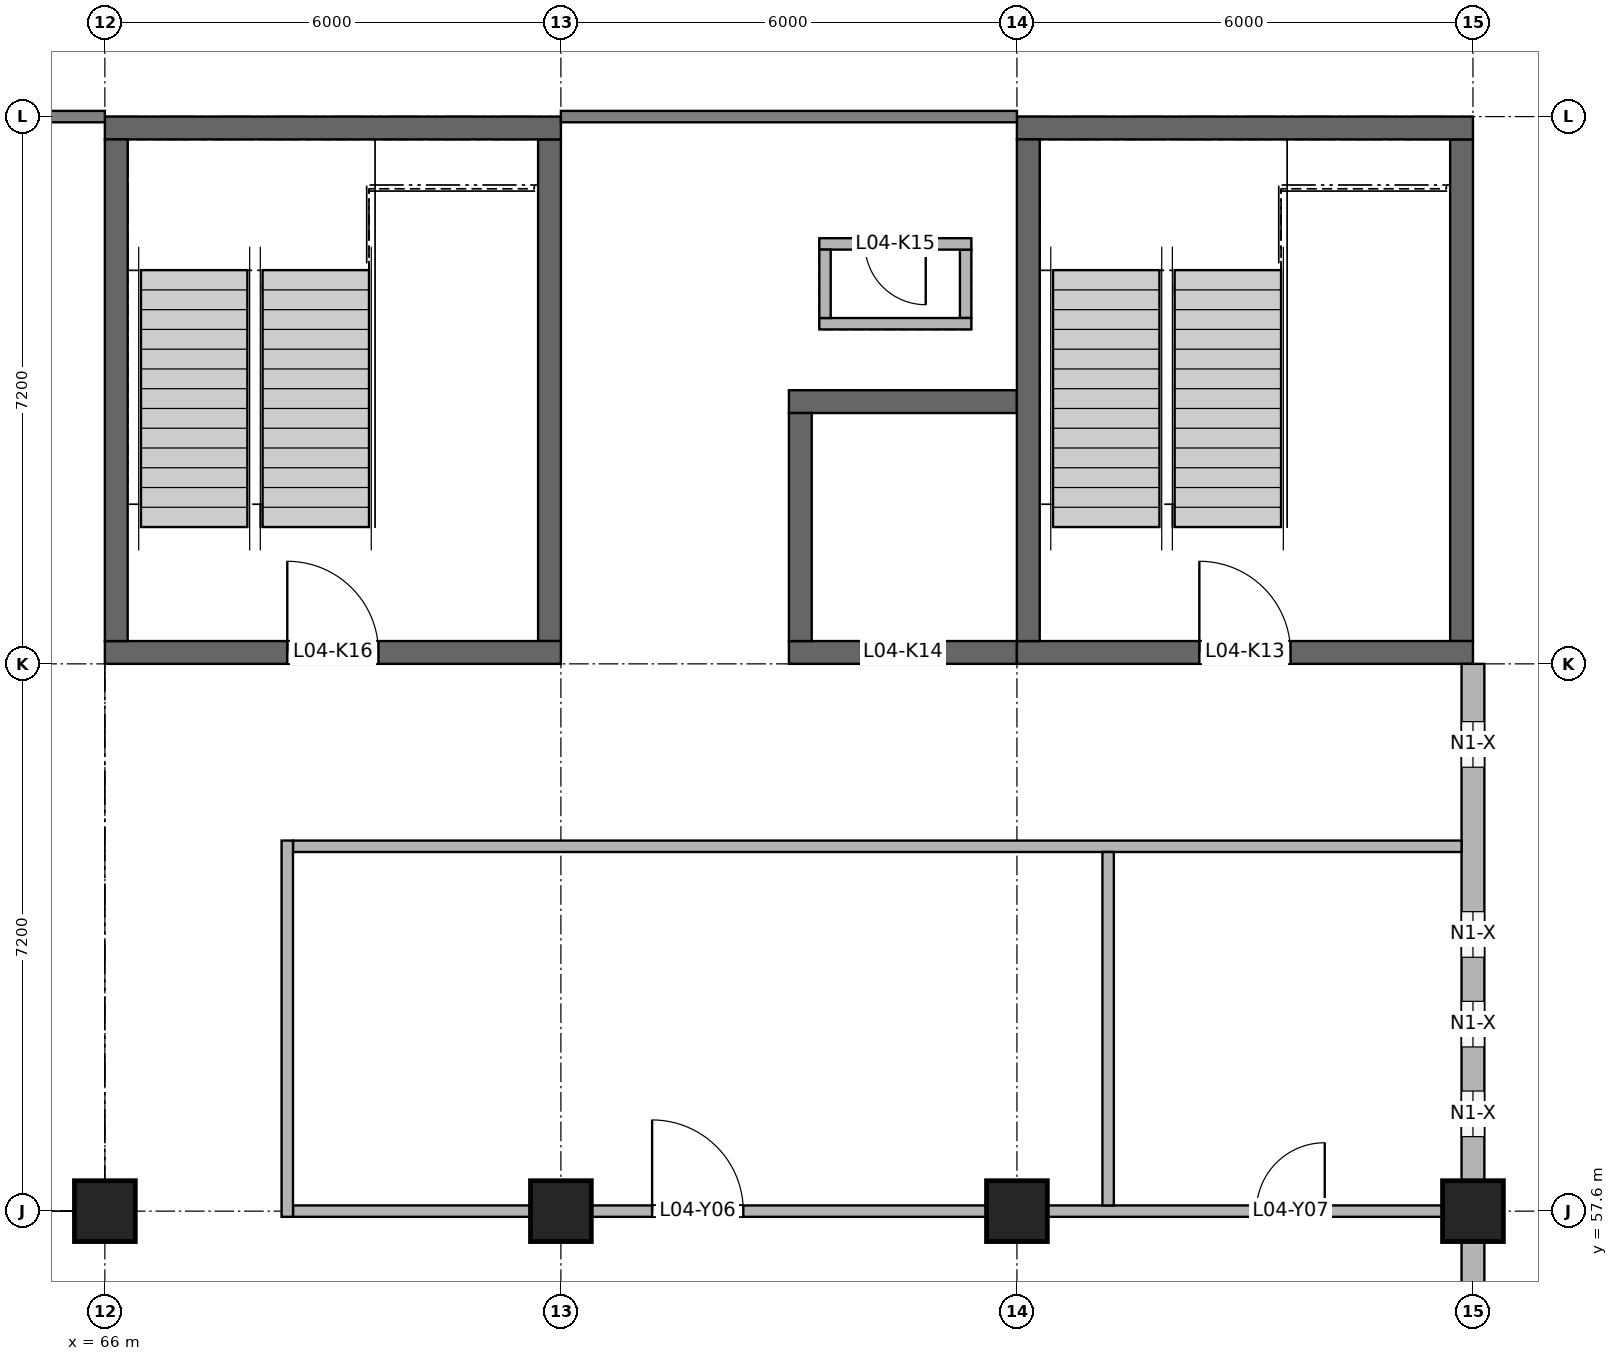
"""IFC4 building model, lengths in metres.
Left out: names, types, materials, properties, quantities, classifications, styles, units other than length and angle.
Written with IfcOpenShell. Run it as: python <this file> out.ifc"""

import sys

from ifc_helpers import new_model, si_unit, direction, frame, frame_2d, origin, origin_2d, place, context, subcontext, project, spatial, rectangle, extrude, element, fill, save


model = new_model("IFC4")
c1 = context("Model", 3, precision=1e-05, world=origin(), true_north=direction((0.0, 1.0)))
c2 = subcontext(c1, "Body", "Model", "MODEL_VIEW")
j1 = project(units=[si_unit("LENGTHUNIT", "METRE"), si_unit("PLANEANGLEUNIT", "RADIAN")], contexts=[c1])
p1 = place(None, origin())
s1 = spatial("IfcSite", under=j1, at=p1, CompositionType="ELEMENT")
p2 = place(p1, origin())
s2 = spatial("IfcBuilding", under=s1, at=p2, CompositionType="ELEMENT")
p3 = place(p2, frame((0.0, 0.0, 16.8)))
s3 = spatial("IfcBuildingStorey", under=s2, at=p3, CompositionType="ELEMENT", Elevation=16.8)
p4 = place(p3, frame((78.0, 64.95, 0.0), z_axis=(0.0, 0.0, 1.0), x_axis=(1.0, 0.0, 0.0)))
e1 = element("IfcWall", 1, at=p4, inside=s3, PredefinedType="SHEAR", context=c2, shape_type="SweptSolid", body=[
    extrude(rectangle(XDim=6.0, YDim=0.3, at=frame_2d((3.0, 0.0))), origin(), (0.0, 0.0, 1.0), 3.95),
])
p5 = place(p4, frame((2.4, 0.0, 0.0)))
e2 = element("IfcOpeningElement", 2, at=p5, cuts=e1, PredefinedType="OPENING", context=c2, shape_type="SweptSolid", body=[
    extrude(rectangle(XDim=1.2, YDim=2.1, at=frame_2d((0.6, 1.05))), frame((0.0, 0.16, 0.0), z_axis=(0.0, -1.0, 0.0), x_axis=(1.0, 0.0, 0.0)), (0.0, 0.0, 1.0), 0.32),
])
p6 = place(p3, frame((78.0, 71.85, 0.0), z_axis=(0.0, 0.0, 1.0), x_axis=(1.0, 0.0, 0.0)))
e3 = element("IfcWall", 3, at=p6, inside=s3, PredefinedType="SHEAR", context=c2, shape_type="SweptSolid", body=[
    extrude(rectangle(XDim=6.0, YDim=0.3, at=frame_2d((3.0, 0.0))), origin(), (0.0, 0.0, 1.0), 3.95),
])
for number, where, z_axis, x_axis in (
    (4, (78.15, 65.1, 0.0), (0.0, 0.0, 1.0), (0.0, 1.0, 0.0)),
    (5, (83.85, 65.1, 0.0), (0.0, 0.0, 1.0), (0.0, 1.0, 0.0)),
):
    element("IfcWall", number, at=place(p3, frame(where, z_axis=z_axis, x_axis=x_axis)), inside=s3, PredefinedType="SHEAR", context=c2, shape_type="SweptSolid", body=[
        extrude(rectangle(XDim=6.6, YDim=0.3, at=frame_2d((3.3, 0.0))), origin(), (0.0, 0.0, 1.0), 3.95),
    ])
p7 = place(p3, frame((75.0, 64.95, 0.0), z_axis=(0.0, 0.0, 1.0), x_axis=(1.0, 0.0, 0.0)))
e6 = element("IfcWall", 6, at=p7, inside=s3, PredefinedType="SHEAR", context=c2, shape_type="SweptSolid", body=[
    extrude(rectangle(XDim=3.0, YDim=0.3, at=frame_2d((1.5, 0.0))), origin(), (0.0, 0.0, 1.0), 4.2),
])
p8 = place(p7, frame((0.95, 0.0, 0.0)))
e7 = element("IfcOpeningElement", 7, at=p8, cuts=e6, PredefinedType="OPENING", context=c2, shape_type="SweptSolid", body=[
    extrude(rectangle(XDim=1.1, YDim=2.1, at=frame_2d((0.55, 1.05))), frame((0.0, 0.16, 0.0), z_axis=(0.0, -1.0, 0.0), x_axis=(1.0, 0.0, 0.0)), (0.0, 0.0, 1.0), 0.32),
])
for number, where, z_axis, x_axis in (
    (8, (75.0, 68.25, 0.0), (0.0, 0.0, 1.0), (1.0, 0.0, 0.0)),
    (9, (75.15, 65.1, 0.0), (0.0, 0.0, 1.0), (0.0, 1.0, 0.0)),
):
    element("IfcWall", number, at=place(p3, frame(where, z_axis=z_axis, x_axis=x_axis)), inside=s3, PredefinedType="SHEAR", context=c2, shape_type="SweptSolid", body=[
        extrude(rectangle(XDim=3.0, YDim=0.3, at=frame_2d((1.5, 0.0))), origin(), (0.0, 0.0, 1.0), 4.2),
    ])
p9 = place(p3, frame((66.0, 64.95, 0.0), z_axis=(0.0, 0.0, 1.0), x_axis=(1.0, 0.0, 0.0)))
e10 = element("IfcWall", 10, at=p9, inside=s3, PredefinedType="SHEAR", context=c2, shape_type="SweptSolid", body=[
    extrude(rectangle(XDim=6.0, YDim=0.3, at=frame_2d((3.0, 0.0))), origin(), (0.0, 0.0, 1.0), 4.0),
])
p10 = place(p9, frame((2.4, 0.0, 0.0)))
e11 = element("IfcOpeningElement", 11, at=p10, cuts=e10, PredefinedType="OPENING", context=c2, shape_type="SweptSolid", body=[
    extrude(rectangle(XDim=1.2, YDim=2.1, at=frame_2d((0.6, 1.05))), frame((0.0, 0.16, 0.0), z_axis=(0.0, -1.0, 0.0), x_axis=(1.0, 0.0, 0.0)), (0.0, 0.0, 1.0), 0.32),
])
p11 = place(p3, frame((66.0, 71.85, 0.0), z_axis=(0.0, 0.0, 1.0), x_axis=(1.0, 0.0, 0.0)))
e12 = element("IfcWall", 12, at=p11, inside=s3, PredefinedType="SHEAR", context=c2, shape_type="SweptSolid", body=[
    extrude(rectangle(XDim=6.0, YDim=0.3, at=frame_2d((3.0, 0.0))), origin(), (0.0, 0.0, 1.0), 4.0),
])
for number, where, z_axis, x_axis in (
    (13, (66.15, 65.1, 0.0), (0.0, 0.0, 1.0), (0.0, 1.0, 0.0)),
    (14, (71.85, 65.1, 0.0), (0.0, 0.0, 1.0), (0.0, 1.0, 0.0)),
):
    element("IfcWall", number, at=place(p3, frame(where, z_axis=z_axis, x_axis=x_axis)), inside=s3, PredefinedType="SHEAR", context=c2, shape_type="SweptSolid", body=[
        extrude(rectangle(XDim=6.6, YDim=0.3, at=frame_2d((3.3, 0.0))), origin(), (0.0, 0.0, 1.0), 4.0),
    ])
p12 = place(p3, frame((75.4, 69.275, 0.0), z_axis=(0.0, 0.0, 1.0), x_axis=(1.0, 0.0, 0.0)))
e15 = element("IfcWall", 15, at=p12, inside=s3, PredefinedType="SOLIDWALL", context=c2, shape_type="SweptSolid", body=[
    extrude(rectangle(XDim=2.0, YDim=0.15, at=frame_2d((1.0, 0.0))), origin(), (0.0, 0.0, 1.0), 4.2),
])
p13 = place(p3, frame((75.4, 70.325, 0.0), z_axis=(0.0, 0.0, 1.0), x_axis=(1.0, 0.0, 0.0)))
e16 = element("IfcWall", 16, at=p13, inside=s3, PredefinedType="SOLIDWALL", context=c2, shape_type="SweptSolid", body=[
    extrude(rectangle(XDim=2.0, YDim=0.15, at=frame_2d((1.0, 0.0))), origin(), (0.0, 0.0, 1.0), 4.2),
])
p14 = place(p13, frame((0.6, 0.0, 0.0)))
e17 = element("IfcOpeningElement", 17, at=p14, cuts=e16, PredefinedType="OPENING", context=c2, shape_type="SweptSolid", body=[
    extrude(rectangle(XDim=0.8, YDim=2.1, at=frame_2d((0.4, 1.05))), frame((0.0, 0.085, 0.0), z_axis=(0.0, -1.0, 0.0), x_axis=(1.0, 0.0, 0.0)), (0.0, 0.0, 1.0), 0.17),
])
for number, where, z_axis, x_axis in (
    (18, (75.475, 69.35, 0.0), (0.0, 0.0, 1.0), (0.0, 1.0, 0.0)),
    (19, (77.325, 69.35, 0.0), (0.0, 0.0, 1.0), (0.0, 1.0, 0.0)),
):
    element("IfcWall", number, at=place(p3, frame(where, z_axis=z_axis, x_axis=x_axis)), inside=s3, PredefinedType="SOLIDWALL", context=c2, shape_type="SweptSolid", body=[
        extrude(rectangle(XDim=0.9, YDim=0.15, at=frame_2d((0.45, 0.0))), origin(), (0.0, 0.0, 1.0), 4.2),
    ])
for number, where, z_axis, x_axis in (
    (20, (66.0, 57.6, 0.0), (0.0, 0.0, 1.0), (1.0, 0.0, 0.0)),
    (21, (72.0, 57.6, 0.0), (0.0, 0.0, 1.0), (1.0, 0.0, 0.0)),
    (22, (78.0, 57.6, 0.0), (0.0, 0.0, 1.0), (1.0, 0.0, 0.0)),
    (23, (84.0, 57.6, 0.0), (0.0, 0.0, 1.0), (1.0, 0.0, 0.0)),
):
    element("IfcColumn", number, at=place(p3, frame(where, z_axis=z_axis, x_axis=x_axis)), inside=s3, PredefinedType="COLUMN", context=c2, shape_type="SweptSolid", body=[
        extrude(rectangle(XDim=0.8, YDim=0.8, at=origin_2d()), origin(), (0.0, 0.0, 1.0), 4.0),
    ])
p15 = place(p3, frame((84.0, 50.8, 0.0), z_axis=(0.0, 0.0, 1.0), x_axis=(0.0, 1.0, 0.0)))
e24 = element("IfcWall", 24, at=p15, inside=s3, PredefinedType="SOLIDWALL", context=c2, shape_type="SweptSolid", body=[
    extrude(rectangle(XDim=6.4, YDim=0.3, at=frame_2d((3.2, 0.0))), origin(), (0.0, 0.0, 1.0), 3.1),
])
p16 = place(p15, frame((0.464, 0.0, 0.9)))
e25 = element("IfcOpeningElement", 25, at=p16, cuts=e24, PredefinedType="OPENING", context=c2, shape_type="SweptSolid", body=[
    extrude(rectangle(XDim=0.6, YDim=1.9, at=frame_2d((0.3, 0.95))), frame((0.0, 0.16, 0.0), z_axis=(0.0, -1.0, 0.0), x_axis=(1.0, 0.0, 0.0)), (0.0, 0.0, 1.0), 0.32),
])
p17 = place(p15, frame((1.528, 0.0, 0.9)))
e26 = element("IfcOpeningElement", 26, at=p17, cuts=e24, PredefinedType="OPENING", context=c2, shape_type="SweptSolid", body=[
    extrude(rectangle(XDim=0.6, YDim=1.9, at=frame_2d((0.3, 0.95))), frame((0.0, 0.16, 0.0), z_axis=(0.0, -1.0, 0.0), x_axis=(1.0, 0.0, 0.0)), (0.0, 0.0, 1.0), 0.32),
])
p18 = place(p15, frame((2.592, 0.0, 0.9)))
e27 = element("IfcOpeningElement", 27, at=p18, cuts=e24, PredefinedType="OPENING", context=c2, shape_type="SweptSolid", body=[
    extrude(rectangle(XDim=0.6, YDim=1.9, at=frame_2d((0.3, 0.95))), frame((0.0, 0.16, 0.0), z_axis=(0.0, -1.0, 0.0), x_axis=(1.0, 0.0, 0.0)), (0.0, 0.0, 1.0), 0.32),
])
p19 = place(p15, frame((3.656, 0.0, 0.9)))
e28 = element("IfcOpeningElement", 28, at=p19, cuts=e24, PredefinedType="OPENING", context=c2, shape_type="SweptSolid", body=[
    extrude(rectangle(XDim=0.6, YDim=1.9, at=frame_2d((0.3, 0.95))), frame((0.0, 0.16, 0.0), z_axis=(0.0, -1.0, 0.0), x_axis=(1.0, 0.0, 0.0)), (0.0, 0.0, 1.0), 0.32),
])
p20 = place(p3, frame((84.0, 58.0, 0.0), z_axis=(0.0, 0.0, 1.0), x_axis=(0.0, 1.0, 0.0)))
e29 = element("IfcWall", 29, at=p20, inside=s3, PredefinedType="SOLIDWALL", context=c2, shape_type="SweptSolid", body=[
    extrude(rectangle(XDim=6.8, YDim=0.3, at=frame_2d((3.4, 0.0))), origin(), (0.0, 0.0, 1.0), 3.1),
])
p21 = place(p20, frame((0.58, 0.0, 0.9)))
e30 = element("IfcOpeningElement", 30, at=p21, cuts=e29, PredefinedType="OPENING", context=c2, shape_type="SweptSolid", body=[
    extrude(rectangle(XDim=0.6, YDim=1.9, at=frame_2d((0.3, 0.95))), frame((0.0, 0.16, 0.0), z_axis=(0.0, -1.0, 0.0), x_axis=(1.0, 0.0, 0.0)), (0.0, 0.0, 1.0), 0.32),
])
p22 = place(p20, frame((1.76, 0.0, 0.9)))
e31 = element("IfcOpeningElement", 31, at=p22, cuts=e29, PredefinedType="OPENING", context=c2, shape_type="SweptSolid", body=[
    extrude(rectangle(XDim=0.6, YDim=1.9, at=frame_2d((0.3, 0.95))), frame((0.0, 0.16, 0.0), z_axis=(0.0, -1.0, 0.0), x_axis=(1.0, 0.0, 0.0)), (0.0, 0.0, 1.0), 0.32),
])
p23 = place(p20, frame((2.94, 0.0, 0.9)))
e32 = element("IfcOpeningElement", 32, at=p23, cuts=e29, PredefinedType="OPENING", context=c2, shape_type="SweptSolid", body=[
    extrude(rectangle(XDim=0.6, YDim=1.9, at=frame_2d((0.3, 0.95))), frame((0.0, 0.16, 0.0), z_axis=(0.0, -1.0, 0.0), x_axis=(1.0, 0.0, 0.0)), (0.0, 0.0, 1.0), 0.32),
])
p24 = place(p20, frame((5.44, 0.0, 0.9)))
e33 = element("IfcOpeningElement", 33, at=p24, cuts=e29, PredefinedType="OPENING", context=c2, shape_type="SweptSolid", body=[
    extrude(rectangle(XDim=0.6, YDim=1.9, at=frame_2d((0.3, 0.95))), frame((0.0, 0.16, 0.0), z_axis=(0.0, -1.0, 0.0), x_axis=(1.0, 0.0, 0.0)), (0.0, 0.0, 1.0), 0.32),
])
p25 = place(p2, frame((0.0, 0.0, 12.6)))
s4 = spatial("IfcBuildingStorey", under=s2, at=p25, CompositionType="ELEMENT", Elevation=12.6)
p26 = place(p25, frame((66.0, 58.1, 0.0), z_axis=(0.0, 0.0, 1.0), x_axis=(0.0, 1.0, 0.0)))
e34 = element("IfcWall", 34, at=p26, inside=s4, PredefinedType="PARTITIONING", context=c2, shape_type="SweptSolid", body=[
    extrude(rectangle(XDim=6.7, YDim=0.2, at=frame_2d((3.35, 0.0))), origin(), (0.0, 0.0, 1.0), 7.3),
])
p27 = place(p3, frame((68.4, 57.525, 0.0), z_axis=(0.0, 0.0, 1.0), x_axis=(0.0, 1.0, 0.0)))
e35 = element("IfcWall", 35, at=p27, inside=s3, PredefinedType="PARTITIONING", context=c2, shape_type="SweptSolid", body=[
    extrude(rectangle(XDim=4.95, YDim=0.15, at=frame_2d((2.475, 0.0))), origin(), (0.0, 0.0, 1.0), 3.2),
])
p28 = place(p3, frame((79.2, 57.675, 0.0), z_axis=(0.0, 0.0, 1.0), x_axis=(0.0, 1.0, 0.0)))
e36 = element("IfcWall", 36, at=p28, inside=s3, PredefinedType="PARTITIONING", context=c2, shape_type="SweptSolid", body=[
    extrude(rectangle(XDim=4.65, YDim=0.15, at=frame_2d((2.325, 0.0))), origin(), (0.0, 0.0, 1.0), 3.2),
])
p29 = place(p3, frame((68.475, 57.6, 0.0), z_axis=(0.0, 0.0, 1.0), x_axis=(1.0, 0.0, 0.0)))
e37 = element("IfcWall", 37, at=p29, inside=s3, PredefinedType="PARTITIONING", context=c2, shape_type="SweptSolid", body=[
    extrude(rectangle(XDim=3.125, YDim=0.15, at=frame_2d((1.562, 0.0))), origin(), (0.0, 0.0, 1.0), 3.2),
])
p30 = place(p3, frame((72.4, 57.6, 0.0), z_axis=(0.0, 0.0, 1.0), x_axis=(1.0, 0.0, 0.0)))
e38 = element("IfcWall", 38, at=p30, inside=s3, PredefinedType="PARTITIONING", context=c2, shape_type="SweptSolid", body=[
    extrude(rectangle(XDim=5.2, YDim=0.15, at=frame_2d((2.6, 0.0))), origin(), (0.0, 0.0, 1.0), 3.2),
])
p31 = place(p30, frame((0.8, 0.0, 0.0)))
e39 = element("IfcOpeningElement", 39, at=p31, cuts=e38, PredefinedType="OPENING", context=c2, shape_type="SweptSolid", body=[
    extrude(rectangle(XDim=1.2, YDim=2.1, at=frame_2d((0.6, 1.05))), frame((0.0, 0.085, 0.0), z_axis=(0.0, -1.0, 0.0), x_axis=(1.0, 0.0, 0.0)), (0.0, 0.0, 1.0), 0.17),
])
p32 = place(p3, frame((78.4, 57.6, 0.0), z_axis=(0.0, 0.0, 1.0), x_axis=(1.0, 0.0, 0.0)))
e40 = element("IfcWall", 40, at=p32, inside=s3, PredefinedType="PARTITIONING", context=c2, shape_type="SweptSolid", body=[
    extrude(rectangle(XDim=5.2, YDim=0.15, at=frame_2d((2.6, 0.0))), origin(), (0.0, 0.0, 1.0), 3.2),
])
p33 = place(p32, frame((2.75, 0.0, 0.0)))
e41 = element("IfcOpeningElement", 41, at=p33, cuts=e40, PredefinedType="OPENING", context=c2, shape_type="SweptSolid", body=[
    extrude(rectangle(XDim=0.9, YDim=2.1, at=frame_2d((0.45, 1.05))), frame((0.0, 0.085, 0.0), z_axis=(0.0, -1.0, 0.0), x_axis=(1.0, 0.0, 0.0)), (0.0, 0.0, 1.0), 0.17),
])
p34 = place(p3, frame((68.475, 62.4, 0.0), z_axis=(0.0, 0.0, 1.0), x_axis=(1.0, 0.0, 0.0)))
e42 = element("IfcWall", 42, at=p34, inside=s3, PredefinedType="PARTITIONING", context=c2, shape_type="SweptSolid", body=[
    extrude(rectangle(XDim=15.375, YDim=0.15, at=frame_2d((7.688, 0.0))), origin(), (0.0, 0.0, 1.0), 4.0),
])
p35 = place(p21, origin())
e43 = element("IfcWindow", 43, at=p35, inside=s3, PartitioningType="SINGLE_PANEL", PredefinedType="WINDOW", context=c2, shape_type="SweptSolid", body=[
    extrude(rectangle(XDim=0.6, YDim=1.9, at=frame_2d((0.3, 0.95))), frame((0.0, 0.03, 0.0), z_axis=(0.0, -1.0, 0.0), x_axis=(1.0, 0.0, 0.0)), (0.0, 0.0, 1.0), 0.06),
])
fill(e30, e43)
p36 = place(p22, origin())
e44 = element("IfcWindow", 44, at=p36, inside=s3, PartitioningType="SINGLE_PANEL", PredefinedType="WINDOW", context=c2, shape_type="SweptSolid", body=[
    extrude(rectangle(XDim=0.6, YDim=1.9, at=frame_2d((0.3, 0.95))), frame((0.0, 0.03, 0.0), z_axis=(0.0, -1.0, 0.0), x_axis=(1.0, 0.0, 0.0)), (0.0, 0.0, 1.0), 0.06),
])
fill(e31, e44)
p37 = place(p23, origin())
e45 = element("IfcWindow", 45, at=p37, inside=s3, PartitioningType="SINGLE_PANEL", PredefinedType="WINDOW", context=c2, shape_type="SweptSolid", body=[
    extrude(rectangle(XDim=0.6, YDim=1.9, at=frame_2d((0.3, 0.95))), frame((0.0, 0.03, 0.0), z_axis=(0.0, -1.0, 0.0), x_axis=(1.0, 0.0, 0.0)), (0.0, 0.0, 1.0), 0.06),
])
fill(e32, e45)
p38 = place(p24, origin())
e46 = element("IfcWindow", 46, at=p38, inside=s3, PartitioningType="SINGLE_PANEL", PredefinedType="WINDOW", context=c2, shape_type="SweptSolid", body=[
    extrude(rectangle(XDim=0.6, YDim=1.9, at=frame_2d((0.3, 0.95))), frame((0.0, 0.03, 0.0), z_axis=(0.0, -1.0, 0.0), x_axis=(1.0, 0.0, 0.0)), (0.0, 0.0, 1.0), 0.06),
])
fill(e33, e46)
p39 = place(p5, origin())
e47 = element("IfcDoor", 47, at=p39, inside=s3, OperationType="SINGLE_SWING_LEFT", PredefinedType="DOOR", context=c2, shape_type="SweptSolid", body=[
    extrude(rectangle(XDim=1.2, YDim=2.1, at=frame_2d((0.6, 1.05))), frame((0.0, 0.025, 0.0), z_axis=(0.0, -1.0, 0.0), x_axis=(1.0, 0.0, 0.0)), (0.0, 0.0, 1.0), 0.05),
])
fill(e2, e47)
p40 = place(p8, origin())
e48 = element("IfcDoor", 48, at=p40, inside=s3, OperationType="DOUBLE_DOOR_SLIDING", PredefinedType="DOOR", context=c2, shape_type="SweptSolid", body=[
    extrude(rectangle(XDim=1.1, YDim=2.1, at=frame_2d((0.55, 1.05))), frame((0.0, 0.025, 0.0), z_axis=(0.0, -1.0, 0.0), x_axis=(1.0, 0.0, 0.0)), (0.0, 0.0, 1.0), 0.05),
])
fill(e7, e48)
p41 = place(p14, frame((0.8, 0.0, 0.0), z_axis=(0.0, 0.0, 1.0), x_axis=(-1.0, 0.0, 0.0)))
e49 = element("IfcDoor", 49, at=p41, inside=s3, OperationType="SINGLE_SWING_LEFT", PredefinedType="DOOR", context=c2, shape_type="SweptSolid", body=[
    extrude(rectangle(XDim=0.8, YDim=2.1, at=frame_2d((0.4, 1.05))), frame((0.0, 0.025, 0.0), z_axis=(0.0, -1.0, 0.0), x_axis=(1.0, 0.0, 0.0)), (0.0, 0.0, 1.0), 0.05),
])
fill(e17, e49)
p42 = place(p10, origin())
e50 = element("IfcDoor", 50, at=p42, inside=s3, OperationType="SINGLE_SWING_LEFT", PredefinedType="DOOR", context=c2, shape_type="SweptSolid", body=[
    extrude(rectangle(XDim=1.2, YDim=2.1, at=frame_2d((0.6, 1.05))), frame((0.0, 0.025, 0.0), z_axis=(0.0, -1.0, 0.0), x_axis=(1.0, 0.0, 0.0)), (0.0, 0.0, 1.0), 0.05),
])
fill(e11, e50)
p43 = place(p31, origin())
e51 = element("IfcDoor", 51, at=p43, inside=s3, OperationType="SINGLE_SWING_LEFT", PredefinedType="DOOR", context=c2, shape_type="SweptSolid", body=[
    extrude(rectangle(XDim=1.2, YDim=2.1, at=frame_2d((0.6, 1.05))), frame((0.0, 0.025, 0.0), z_axis=(0.0, -1.0, 0.0), x_axis=(1.0, 0.0, 0.0)), (0.0, 0.0, 1.0), 0.05),
])
fill(e39, e51)
p44 = place(p33, origin())
e52 = element("IfcDoor", 52, at=p44, inside=s3, OperationType="SINGLE_SWING_RIGHT", PredefinedType="DOOR", context=c2, shape_type="SweptSolid", body=[
    extrude(rectangle(XDim=0.9, YDim=2.1, at=frame_2d((0.45, 1.05))), frame((0.0, 0.025, 0.0), z_axis=(0.0, -1.0, 0.0), x_axis=(1.0, 0.0, 0.0)), (0.0, 0.0, 1.0), 0.05),
])
fill(e41, e52)
save(model, sys.argv[1])
